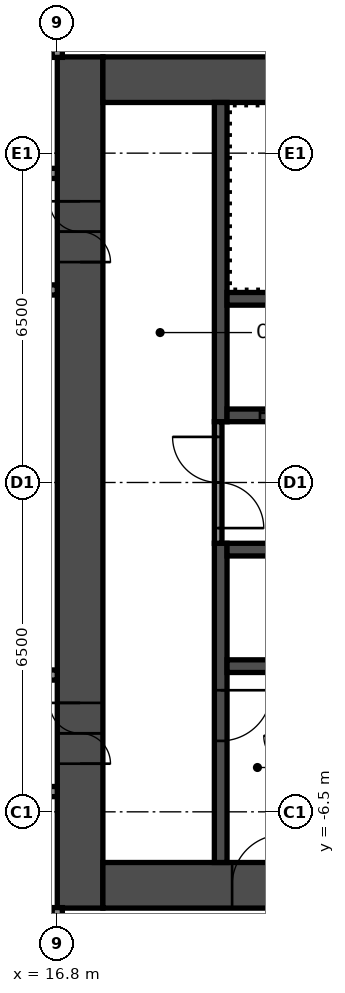
"""IFC4 building model, lengths in metres.
Left out: names, types, materials, properties, quantities, classifications, styles, units other than length and angle.
Written with IfcOpenShell. Run it as: python <this file> out.ifc"""

import sys

from ifc_helpers import new_model, si_unit, direction, frame, frame_2d, origin, place, context, subcontext, project, spatial, rectangle, extrude, element, fill, save


model = new_model("IFC4")
c1 = context("Model", 3, precision=1e-05, world=origin(), true_north=direction((0.0, 1.0)))
c2 = subcontext(c1, "Body", "Model", "MODEL_VIEW")
j1 = project(units=[si_unit("LENGTHUNIT", "METRE"), si_unit("PLANEANGLEUNIT", "RADIAN")], contexts=[c1])
p1 = place(None, origin())
s1 = spatial("IfcSite", under=j1, at=p1, CompositionType="ELEMENT")
p2 = place(p1, origin())
s2 = spatial("IfcBuilding", under=s1, at=p2, CompositionType="ELEMENT")
p3 = place(p2, frame((0.0, 0.0, 19.8)))
s3 = spatial("IfcBuildingStorey", under=s2, at=p3, CompositionType="ELEMENT", Elevation=19.8)
p4 = place(p3, frame((17.25, -8.4, 0.0), z_axis=(0.0, 0.0, 1.0), x_axis=(0.0, 1.0, 0.0)))
e1 = element("IfcWall", 1, at=p4, inside=s3, PredefinedType="SHEAR", context=c2, shape_type="SweptSolid", body=[
    extrude(rectangle(XDim=16.8, YDim=0.9, at=frame_2d((8.4, 0.0))), origin(), (0.0, 0.0, 1.0), 2.8),
])
p5 = place(p4, frame((12.75, 0.0, 0.0)))
e2 = element("IfcOpeningElement", 2, at=p5, cuts=e1, PredefinedType="OPENING", context=c2, shape_type="SweptSolid", body=[
    extrude(rectangle(XDim=1.2, YDim=2.1, at=frame_2d((0.6, 1.05))), frame((0.0, 0.46, 0.0), z_axis=(0.0, -1.0, 0.0), x_axis=(1.0, 0.0, 0.0)), (0.0, 0.0, 1.0), 0.92),
])
p6 = place(p4, frame((2.85, 0.0, 0.0)))
e3 = element("IfcOpeningElement", 3, at=p6, cuts=e1, PredefinedType="OPENING", context=c2, shape_type="SweptSolid", body=[
    extrude(rectangle(XDim=1.2, YDim=2.1, at=frame_2d((0.6, 1.05))), frame((0.0, 0.46, 0.0), z_axis=(0.0, -1.0, 0.0), x_axis=(1.0, 0.0, 0.0)), (0.0, 0.0, 1.0), 0.92),
])
p7 = place(p3, frame((17.7, 7.95, 0.0), z_axis=(0.0, 0.0, 1.0), x_axis=(1.0, 0.0, 0.0)))
e4 = element("IfcWall", 4, at=p7, inside=s3, PredefinedType="SHEAR", context=c2, shape_type="SweptSolid", body=[
    extrude(rectangle(XDim=15.0, YDim=0.9, at=frame_2d((7.5, 0.0))), origin(), (0.0, 0.0, 1.0), 2.8),
])
p8 = place(p7, frame((10.4, 0.0, 0.0)))
e5 = element("IfcOpeningElement", 5, at=p8, cuts=e4, PredefinedType="OPENING", context=c2, shape_type="SweptSolid", body=[
    extrude(rectangle(XDim=1.2, YDim=2.1, at=frame_2d((0.6, 1.05))), frame((0.0, 0.46, 0.0), z_axis=(0.0, -1.0, 0.0), x_axis=(1.0, 0.0, 0.0)), (0.0, 0.0, 1.0), 0.92),
])
p9 = place(p7, frame((13.35, 0.0, 0.0)))
e6 = element("IfcOpeningElement", 6, at=p9, cuts=e4, PredefinedType="OPENING", context=c2, shape_type="SweptSolid", body=[
    extrude(rectangle(XDim=0.9, YDim=2.1, at=frame_2d((0.45, 1.05))), frame((0.0, 0.46, 0.0), z_axis=(0.0, -1.0, 0.0), x_axis=(1.0, 0.0, 0.0)), (0.0, 0.0, 1.0), 0.92),
])
p10 = place(p3, frame((17.7, -7.95, 0.0), z_axis=(0.0, 0.0, 1.0), x_axis=(1.0, 0.0, 0.0)))
e7 = element("IfcWall", 7, at=p10, inside=s3, PredefinedType="SHEAR", context=c2, shape_type="SweptSolid", body=[
    extrude(rectangle(XDim=15.0, YDim=0.9, at=frame_2d((7.5, 0.0))), origin(), (0.0, 0.0, 1.0), 2.8),
])
p11 = place(p10, frame((2.55, 0.0, 0.0)))
e8 = element("IfcOpeningElement", 8, at=p11, cuts=e7, PredefinedType="OPENING", context=c2, shape_type="SweptSolid", body=[
    extrude(rectangle(XDim=1.0, YDim=2.1, at=frame_2d((0.5, 1.05))), frame((0.0, 0.46, 0.0), z_axis=(0.0, -1.0, 0.0), x_axis=(1.0, 0.0, 0.0)), (0.0, 0.0, 1.0), 0.92),
])
p12 = place(p3, frame((20.025, 1.2, 0.0), z_axis=(0.0, 0.0, 1.0), x_axis=(0.0, 1.0, 0.0)))
e9 = element("IfcWall", 9, at=p12, inside=s3, PredefinedType="SHEAR", context=c2, shape_type="SweptSolid", body=[
    extrude(rectangle(XDim=6.3, YDim=0.25, at=frame_2d((3.15, 0.0))), origin(), (0.0, 0.0, 1.0), 2.8),
])
p13 = place(p3, frame((20.025, -7.5, 0.0), z_axis=(0.0, 0.0, 1.0), x_axis=(0.0, 1.0, 0.0)))
e10 = element("IfcWall", 10, at=p13, inside=s3, PredefinedType="SHEAR", context=c2, shape_type="SweptSolid", body=[
    extrude(rectangle(XDim=6.3, YDim=0.25, at=frame_2d((3.15, 0.0))), origin(), (0.0, 0.0, 1.0), 2.8),
])
p14 = place(p13, frame((2.4, 0.0, 0.0)))
e11 = element("IfcOpeningElement", 11, at=p14, cuts=e10, PredefinedType="OPENING", context=c2, shape_type="SweptSolid", body=[
    extrude(rectangle(XDim=1.0, YDim=2.1, at=frame_2d((0.5, 1.05))), frame((0.0, 0.135, 0.0), z_axis=(0.0, -1.0, 0.0), x_axis=(1.0, 0.0, 0.0)), (0.0, 0.0, 1.0), 0.27),
])
p15 = place(p3, frame((20.15, 1.325, 0.0), z_axis=(0.0, 0.0, 1.0), x_axis=(1.0, 0.0, 0.0)))
e12 = element("IfcWall", 12, at=p15, inside=s3, PredefinedType="SHEAR", context=c2, shape_type="SweptSolid", body=[
    extrude(rectangle(XDim=7.5, YDim=0.25, at=frame_2d((3.75, 0.0))), origin(), (0.0, 0.0, 1.0), 2.8),
])
p16 = place(p15, frame((0.65, 0.0, 0.0)))
e13 = element("IfcOpeningElement", 13, at=p16, cuts=e12, PredefinedType="OPENING", context=c2, shape_type="SweptSolid", body=[
    extrude(rectangle(XDim=1.1, YDim=2.1, at=frame_2d((0.55, 1.05))), frame((0.0, 0.135, 0.0), z_axis=(0.0, -1.0, 0.0), x_axis=(1.0, 0.0, 0.0)), (0.0, 0.0, 1.0), 0.27),
])
p17 = place(p15, frame((3.05, 0.0, 0.0)))
e14 = element("IfcOpeningElement", 14, at=p17, cuts=e12, PredefinedType="OPENING", context=c2, shape_type="SweptSolid", body=[
    extrude(rectangle(XDim=1.1, YDim=2.1, at=frame_2d((0.55, 1.05))), frame((0.0, 0.135, 0.0), z_axis=(0.0, -1.0, 0.0), x_axis=(1.0, 0.0, 0.0)), (0.0, 0.0, 1.0), 0.27),
])
p18 = place(p15, frame((5.45, 0.0, 0.0)))
e15 = element("IfcOpeningElement", 15, at=p18, cuts=e12, PredefinedType="OPENING", context=c2, shape_type="SweptSolid", body=[
    extrude(rectangle(XDim=1.1, YDim=2.1, at=frame_2d((0.55, 1.05))), frame((0.0, 0.135, 0.0), z_axis=(0.0, -1.0, 0.0), x_axis=(1.0, 0.0, 0.0)), (0.0, 0.0, 1.0), 0.27),
])
for number, where, z_axis, x_axis in (
    (16, (20.15, 3.625, 0.0), (0.0, 0.0, 1.0), (1.0, 0.0, 0.0)),
    (17, (20.15, -1.325, 0.0), (0.0, 0.0, 1.0), (1.0, 0.0, 0.0)),
    (18, (20.15, -3.625, 0.0), (0.0, 0.0, 1.0), (1.0, 0.0, 0.0)),
):
    element("IfcWall", number, at=place(p3, frame(where, z_axis=z_axis, x_axis=x_axis)), inside=s3, PredefinedType="SHEAR", context=c2, shape_type="SweptSolid", body=[
        extrude(rectangle(XDim=7.5, YDim=0.25, at=frame_2d((3.75, 0.0))), origin(), (0.0, 0.0, 1.0), 2.8),
    ])
p19 = place(p3, frame((19.975, -1.2, 0.0), z_axis=(0.0, 0.0, 1.0), x_axis=(0.0, 1.0, 0.0)))
e19 = element("IfcWall", 19, at=p19, inside=s3, PredefinedType="PARTITIONING", context=c2, shape_type="SweptSolid", body=[
    extrude(rectangle(XDim=2.4, YDim=0.15, at=frame_2d((1.2, 0.0))), origin(), (0.0, 0.0, 1.0), 2.8),
])
p20 = place(p19, frame((0.3, 0.0, 0.0)))
e20 = element("IfcOpeningElement", 20, at=p20, cuts=e19, PredefinedType="OPENING", context=c2, shape_type="SweptSolid", body=[
    extrude(rectangle(XDim=1.8, YDim=2.1, at=frame_2d((0.9, 1.05))), frame((0.0, 0.085, 0.0), z_axis=(0.0, -1.0, 0.0), x_axis=(1.0, 0.0, 0.0)), (0.0, 0.0, 1.0), 0.17),
])
p21 = place(p3, frame((-16.8, -6.1, 0.0), z_axis=(0.0, 0.0, 1.0), x_axis=(1.0, 0.0, 0.0)))
e21 = element("IfcWall", 21, at=p21, inside=s3, PredefinedType="PARTITIONING", context=c2, shape_type="SweptSolid", body=[
    extrude(rectangle(XDim=33.6, YDim=0.2, at=frame_2d((16.8, 0.0))), origin(), (0.0, 0.0, 1.0), 2.8),
])
p22 = place(p21, frame((5.4, 0.0, 0.0)))
e22 = element("IfcOpeningElement", 22, at=p22, cuts=e21, PredefinedType="OPENING", context=c2, shape_type="SweptSolid", body=[
    extrude(rectangle(XDim=1.0, YDim=2.1, at=frame_2d((0.5, 1.05))), frame((0.0, 0.11, 0.0), z_axis=(0.0, -1.0, 0.0), x_axis=(1.0, 0.0, 0.0)), (0.0, 0.0, 1.0), 0.22),
])
p23 = place(p21, frame((12.1, 0.0, 0.0)))
e23 = element("IfcOpeningElement", 23, at=p23, cuts=e21, PredefinedType="OPENING", context=c2, shape_type="SweptSolid", body=[
    extrude(rectangle(XDim=1.0, YDim=2.1, at=frame_2d((0.5, 1.05))), frame((0.0, 0.11, 0.0), z_axis=(0.0, -1.0, 0.0), x_axis=(1.0, 0.0, 0.0)), (0.0, 0.0, 1.0), 0.22),
])
p24 = place(p21, frame((18.8, 0.0, 0.0)))
e24 = element("IfcOpeningElement", 24, at=p24, cuts=e21, PredefinedType="OPENING", context=c2, shape_type="SweptSolid", body=[
    extrude(rectangle(XDim=1.0, YDim=2.1, at=frame_2d((0.5, 1.05))), frame((0.0, 0.11, 0.0), z_axis=(0.0, -1.0, 0.0), x_axis=(1.0, 0.0, 0.0)), (0.0, 0.0, 1.0), 0.22),
])
p25 = place(p21, frame((30.6, 0.0, 0.0)))
e25 = element("IfcOpeningElement", 25, at=p25, cuts=e21, PredefinedType="OPENING", context=c2, shape_type="SweptSolid", body=[
    extrude(rectangle(XDim=1.0, YDim=2.1, at=frame_2d((0.5, 1.05))), frame((0.0, 0.11, 0.0), z_axis=(0.0, -1.0, 0.0), x_axis=(1.0, 0.0, 0.0)), (0.0, 0.0, 1.0), 0.22),
])
p26 = place(p3, frame((-16.8, -3.8, 0.0), z_axis=(0.0, 0.0, 1.0), x_axis=(1.0, 0.0, 0.0)))
e26 = element("IfcWall", 26, at=p26, inside=s3, PredefinedType="PARTITIONING", context=c2, shape_type="SweptSolid", body=[
    extrude(rectangle(XDim=33.6, YDim=0.2, at=frame_2d((16.8, 0.0))), origin(), (0.0, 0.0, 1.0), 2.8),
])
p27 = place(p26, frame((9.88, 0.0, 0.0)))
e27 = element("IfcOpeningElement", 27, at=p27, cuts=e26, PredefinedType="OPENING", context=c2, shape_type="SweptSolid", body=[
    extrude(rectangle(XDim=0.9, YDim=2.1, at=frame_2d((0.45, 1.05))), frame((0.0, 0.11, 0.0), z_axis=(0.0, -1.0, 0.0), x_axis=(1.0, 0.0, 0.0)), (0.0, 0.0, 1.0), 0.22),
])
p28 = place(p26, frame((14.08, 0.0, 0.0)))
e28 = element("IfcOpeningElement", 28, at=p28, cuts=e26, PredefinedType="OPENING", context=c2, shape_type="SweptSolid", body=[
    extrude(rectangle(XDim=0.9, YDim=2.1, at=frame_2d((0.45, 1.05))), frame((0.0, 0.11, 0.0), z_axis=(0.0, -1.0, 0.0), x_axis=(1.0, 0.0, 0.0)), (0.0, 0.0, 1.0), 0.22),
])
p29 = place(p26, frame((27.355, 0.0, 0.0)))
e29 = element("IfcOpeningElement", 29, at=p29, cuts=e26, PredefinedType="OPENING", context=c2, shape_type="SweptSolid", body=[
    extrude(rectangle(XDim=0.9, YDim=2.1, at=frame_2d((0.45, 1.05))), frame((0.0, 0.11, 0.0), z_axis=(0.0, -1.0, 0.0), x_axis=(1.0, 0.0, 0.0)), (0.0, 0.0, 1.0), 0.22),
])
p30 = place(p26, frame((31.555, 0.0, 0.0)))
e30 = element("IfcOpeningElement", 30, at=p30, cuts=e26, PredefinedType="OPENING", context=c2, shape_type="SweptSolid", body=[
    extrude(rectangle(XDim=0.9, YDim=2.1, at=frame_2d((0.45, 1.05))), frame((0.0, 0.11, 0.0), z_axis=(0.0, -1.0, 0.0), x_axis=(1.0, 0.0, 0.0)), (0.0, 0.0, 1.0), 0.22),
])
p31 = place(p3, frame((-16.8, 3.8, 0.0), z_axis=(0.0, 0.0, 1.0), x_axis=(1.0, 0.0, 0.0)))
e31 = element("IfcWall", 31, at=p31, inside=s3, PredefinedType="PARTITIONING", context=c2, shape_type="SweptSolid", body=[
    extrude(rectangle(XDim=33.6, YDim=0.2, at=frame_2d((16.8, 0.0))), origin(), (0.0, 0.0, 1.0), 2.8),
])
p32 = place(p31, frame((2.24, 0.0, 0.0)))
e32 = element("IfcOpeningElement", 32, at=p32, cuts=e31, PredefinedType="OPENING", context=c2, shape_type="SweptSolid", body=[
    extrude(rectangle(XDim=0.9, YDim=2.1, at=frame_2d((0.45, 1.05))), frame((0.0, 0.11, 0.0), z_axis=(0.0, -1.0, 0.0), x_axis=(1.0, 0.0, 0.0)), (0.0, 0.0, 1.0), 0.22),
])
p33 = place(p31, frame((6.44, 0.0, 0.0)))
e33 = element("IfcOpeningElement", 33, at=p33, cuts=e31, PredefinedType="OPENING", context=c2, shape_type="SweptSolid", body=[
    extrude(rectangle(XDim=0.9, YDim=2.1, at=frame_2d((0.45, 1.05))), frame((0.0, 0.11, 0.0), z_axis=(0.0, -1.0, 0.0), x_axis=(1.0, 0.0, 0.0)), (0.0, 0.0, 1.0), 0.22),
])
p34 = place(p31, frame((18.03, 0.0, 0.0)))
e34 = element("IfcOpeningElement", 34, at=p34, cuts=e31, PredefinedType="OPENING", context=c2, shape_type="SweptSolid", body=[
    extrude(rectangle(XDim=0.9, YDim=2.1, at=frame_2d((0.45, 1.05))), frame((0.0, 0.11, 0.0), z_axis=(0.0, -1.0, 0.0), x_axis=(1.0, 0.0, 0.0)), (0.0, 0.0, 1.0), 0.22),
])
p35 = place(p31, frame((22.23, 0.0, 0.0)))
e35 = element("IfcOpeningElement", 35, at=p35, cuts=e31, PredefinedType="OPENING", context=c2, shape_type="SweptSolid", body=[
    extrude(rectangle(XDim=0.9, YDim=2.1, at=frame_2d((0.45, 1.05))), frame((0.0, 0.11, 0.0), z_axis=(0.0, -1.0, 0.0), x_axis=(1.0, 0.0, 0.0)), (0.0, 0.0, 1.0), 0.22),
])
p36 = place(p3, frame((-16.8, 6.1, 0.0), z_axis=(0.0, 0.0, 1.0), x_axis=(1.0, 0.0, 0.0)))
e36 = element("IfcWall", 36, at=p36, inside=s3, PredefinedType="PARTITIONING", context=c2, shape_type="SweptSolid", body=[
    extrude(rectangle(XDim=33.6, YDim=0.2, at=frame_2d((16.8, 0.0))), origin(), (0.0, 0.0, 1.0), 2.8),
])
p37 = place(p36, frame((5.4, 0.0, 0.0)))
e37 = element("IfcOpeningElement", 37, at=p37, cuts=e36, PredefinedType="OPENING", context=c2, shape_type="SweptSolid", body=[
    extrude(rectangle(XDim=1.0, YDim=2.1, at=frame_2d((0.5, 1.05))), frame((0.0, 0.11, 0.0), z_axis=(0.0, -1.0, 0.0), x_axis=(1.0, 0.0, 0.0)), (0.0, 0.0, 1.0), 0.22),
])
p38 = place(p36, frame((12.1, 0.0, 0.0)))
e38 = element("IfcOpeningElement", 38, at=p38, cuts=e36, PredefinedType="OPENING", context=c2, shape_type="SweptSolid", body=[
    extrude(rectangle(XDim=1.0, YDim=2.1, at=frame_2d((0.5, 1.05))), frame((0.0, 0.11, 0.0), z_axis=(0.0, -1.0, 0.0), x_axis=(1.0, 0.0, 0.0)), (0.0, 0.0, 1.0), 0.22),
])
p39 = place(p36, frame((18.87, 0.0, 0.0)))
e39 = element("IfcOpeningElement", 39, at=p39, cuts=e36, PredefinedType="OPENING", context=c2, shape_type="SweptSolid", body=[
    extrude(rectangle(XDim=0.9, YDim=2.1, at=frame_2d((0.45, 1.05))), frame((0.0, 0.11, 0.0), z_axis=(0.0, -1.0, 0.0), x_axis=(1.0, 0.0, 0.0)), (0.0, 0.0, 1.0), 0.22),
])
p40 = place(p36, frame((23.07, 0.0, 0.0)))
e40 = element("IfcOpeningElement", 40, at=p40, cuts=e36, PredefinedType="OPENING", context=c2, shape_type="SweptSolid", body=[
    extrude(rectangle(XDim=0.9, YDim=2.1, at=frame_2d((0.45, 1.05))), frame((0.0, 0.11, 0.0), z_axis=(0.0, -1.0, 0.0), x_axis=(1.0, 0.0, 0.0)), (0.0, 0.0, 1.0), 0.22),
])
p41 = place(p36, frame((27.2, 0.0, 0.0)))
e41 = element("IfcOpeningElement", 41, at=p41, cuts=e36, PredefinedType="OPENING", context=c2, shape_type="SweptSolid", body=[
    extrude(rectangle(XDim=1.0, YDim=2.1, at=frame_2d((0.5, 1.05))), frame((0.0, 0.11, 0.0), z_axis=(0.0, -1.0, 0.0), x_axis=(1.0, 0.0, 0.0)), (0.0, 0.0, 1.0), 0.22),
])
for number, where, z_axis, x_axis in (
    (42, (16.8, -20.3, 0.0), (0.0, 0.0, 1.0), (0.0, 1.0, 0.0)),
    (43, (16.8, 8.39, 0.0), (0.0, 0.0, 1.0), (0.0, 1.0, 0.0)),
):
    element("IfcWall", number, at=place(p3, frame(where, z_axis=z_axis, x_axis=x_axis)), inside=s3, PredefinedType="PARTITIONING", context=c2, shape_type="SweptSolid", body=[
        extrude(rectangle(XDim=11.91, YDim=0.2, at=frame_2d((5.955, 0.0))), origin(), (0.0, 0.0, 1.0), 2.8),
    ])
p42 = place(p5, origin())
e44 = element("IfcDoor", 44, at=p42, inside=s3, OperationType="DOUBLE_DOOR_SINGLE_SWING", PredefinedType="DOOR", context=c2, shape_type="SweptSolid", body=[
    extrude(rectangle(XDim=1.2, YDim=2.1, at=frame_2d((0.6, 1.05))), frame((0.0, 0.025, 0.0), z_axis=(0.0, -1.0, 0.0), x_axis=(1.0, 0.0, 0.0)), (0.0, 0.0, 1.0), 0.05),
])
fill(e2, e44)
p43 = place(p6, origin())
e45 = element("IfcDoor", 45, at=p43, inside=s3, OperationType="DOUBLE_DOOR_SINGLE_SWING", PredefinedType="DOOR", context=c2, shape_type="SweptSolid", body=[
    extrude(rectangle(XDim=1.2, YDim=2.1, at=frame_2d((0.6, 1.05))), frame((0.0, 0.025, 0.0), z_axis=(0.0, -1.0, 0.0), x_axis=(1.0, 0.0, 0.0)), (0.0, 0.0, 1.0), 0.05),
])
fill(e3, e45)
p44 = place(p11, origin())
e46 = element("IfcDoor", 46, at=p44, inside=s3, OperationType="SINGLE_SWING_LEFT", PredefinedType="DOOR", context=c2, shape_type="SweptSolid", body=[
    extrude(rectangle(XDim=1.0, YDim=2.1, at=frame_2d((0.5, 1.05))), frame((0.0, 0.025, 0.0), z_axis=(0.0, -1.0, 0.0), x_axis=(1.0, 0.0, 0.0)), (0.0, 0.0, 1.0), 0.05),
])
fill(e8, e46)
p45 = place(p14, origin())
e47 = element("IfcDoor", 47, at=p45, inside=s3, OperationType="SINGLE_SWING_RIGHT", PredefinedType="DOOR", context=c2, shape_type="SweptSolid", body=[
    extrude(rectangle(XDim=1.0, YDim=2.1, at=frame_2d((0.5, 1.05))), frame((0.0, 0.025, 0.0), z_axis=(0.0, -1.0, 0.0), x_axis=(1.0, 0.0, 0.0)), (0.0, 0.0, 1.0), 0.05),
])
fill(e11, e47)
p46 = place(p20, origin())
e48 = element("IfcDoor", 48, at=p46, inside=s3, OperationType="DOUBLE_DOOR_SINGLE_SWING", PredefinedType="DOOR", context=c2, shape_type="SweptSolid", body=[
    extrude(rectangle(XDim=1.8, YDim=2.1, at=frame_2d((0.9, 1.05))), frame((0.0, 0.025, 0.0), z_axis=(0.0, -1.0, 0.0), x_axis=(1.0, 0.0, 0.0)), (0.0, 0.0, 1.0), 0.05),
])
fill(e20, e48)
p47 = place(p16, origin())
e49 = element("IfcDoor", 49, at=p47, inside=s3, OperationType="DOUBLE_DOOR_SLIDING", PredefinedType="DOOR", context=c2, shape_type="SweptSolid", body=[
    extrude(rectangle(XDim=1.1, YDim=2.1, at=frame_2d((0.55, 1.05))), frame((0.0, 0.025, 0.0), z_axis=(0.0, -1.0, 0.0), x_axis=(1.0, 0.0, 0.0)), (0.0, 0.0, 1.0), 0.05),
])
fill(e13, e49)
save(model, sys.argv[1])
